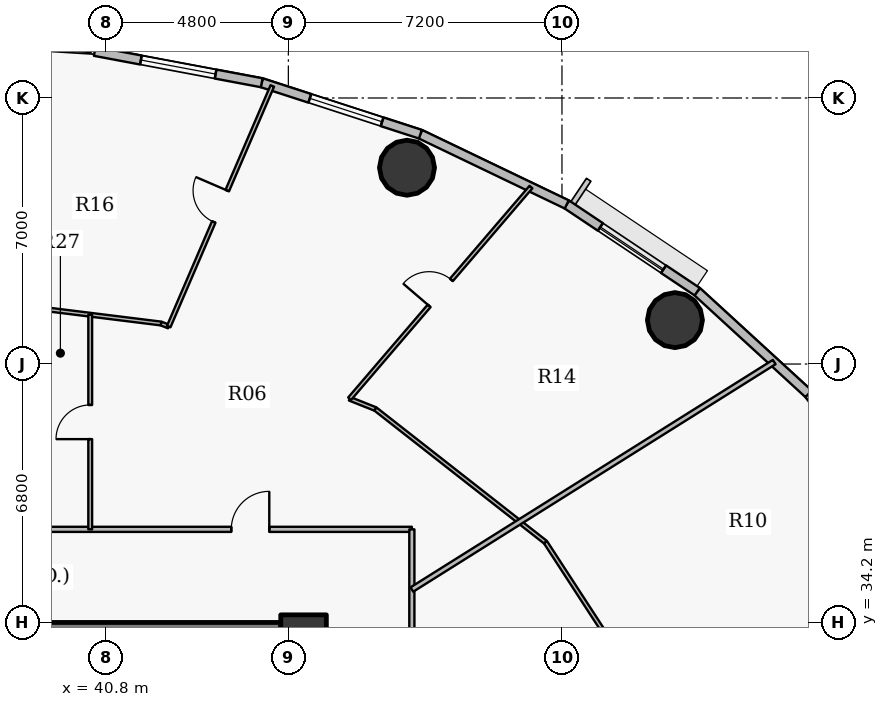
"""IFC4 building model, lengths in metres.
Left out: names, types, materials, properties, quantities, classifications, styles, units other than length and angle.
Written with IfcOpenShell. Run it as: python <this file> out.ifc"""

import sys

from ifc_helpers import new_model, si_unit, direction, frame, frame_2d, origin, origin_2d, place, context, subcontext, project, spatial, rectangle, hollow_circle, extrude, source, transform, mapped, element, fill, save


model = new_model("IFC4")
c1 = context("Model", 3, precision=1e-05, world=origin(), true_north=direction((0.0, 1.0)))
c2 = subcontext(c1, "Body", "Model", "MODEL_VIEW")
j1 = project(units=[si_unit("LENGTHUNIT", "METRE"), si_unit("PLANEANGLEUNIT", "RADIAN")], contexts=[c1])
p1 = place(None, origin())
s1 = spatial("IfcSite", under=j1, at=p1, CompositionType="ELEMENT")
p2 = place(p1, origin())
s2 = spatial("IfcBuilding", under=s1, at=p2, CompositionType="ELEMENT")
p3 = place(p2, frame((0.0, 0.0, 123.45)))
s3 = spatial("IfcBuildingStorey", under=s2, at=p3, CompositionType="ELEMENT", Elevation=123.45)
p4 = place(p3, frame((46.0, 33.8, 0.0), z_axis=(0.0, 0.0, 1.0), x_axis=(1.0, 0.0, 0.0)))
e1 = element("IfcColumn", 1, at=p4, inside=s3, PredefinedType="COLUMN", context=c2, shape_type="SweptSolid", body=[
    extrude(rectangle(XDim=1.2, YDim=1.2, at=origin_2d()), origin(), (0.0, 0.0, 1.0), 3.75),
])
p5 = place(p3, frame((26.6, 33.8, 0.0), z_axis=(0.0, 0.0, 1.0), x_axis=(1.0, 0.0, 0.0)))
e2 = element("IfcWall", 2, at=p5, inside=s3, PredefinedType="SHEAR", context=c2, shape_type="SweptSolid", body=[
    extrude(rectangle(XDim=18.8, YDim=0.8, at=frame_2d((9.4, 0.0))), origin(), (0.0, 0.0, 1.0), 2.95),
])
for number, where, z_axis, x_axis in (
    (3, (55.773, 42.156, 0.0), (0.0, 0.0, 1.0), (1.0, 0.0, 0.0)),
    (4, (48.722, 46.165, 0.0), (0.0, 0.0, 1.0), (1.0, 0.0, 0.0)),
):
    element("IfcColumn", number, at=place(p3, frame(where, z_axis=z_axis, x_axis=x_axis)), inside=s3, PredefinedType="COLUMN", context=c2, shape_type="SweptSolid", body=[
        extrude(hollow_circle(Radius=0.725, WallThickness=0.042, at=origin_2d()), origin(), (0.0, 0.0, 1.0), 3.75),
    ])
p6 = place(p3, frame((59.289, 40.217, 0.0), z_axis=(0.0, 0.0, 1.0), x_axis=(0.616272103517, -0.787533297345, 0.0)))
e5 = element("IfcWall", 5, at=p6, inside=s3, PredefinedType="SOLIDWALL", context=c2, shape_type="SweptSolid", body=[
    extrude(rectangle(XDim=3.823, YDim=0.24, at=frame_2d((1.912, 0.0))), origin(), (0.0, 0.0, 1.0), 3.5),
])
p7 = place(p6, frame((0.912, 0.0, 0.9)))
e6 = element("IfcOpeningElement", 6, at=p7, cuts=e5, PredefinedType="OPENING", context=c2, shape_type="SweptSolid", body=[
    extrude(rectangle(XDim=2.0, YDim=1.75, at=origin_2d()), frame((1.0, 0.13, 0.875), z_axis=(0.0, -1.0, 0.0), x_axis=(1.0, 0.0, 0.0)), (0.0, 0.0, 1.0), 0.26),
])
p8 = place(p3, frame((56.358, 42.903, 0.0), z_axis=(0.0, 0.0, 1.0), x_axis=(0.737113356241, -0.675769117414, 0.0)))
e7 = element("IfcWall", 7, at=p8, inside=s3, PredefinedType="SOLIDWALL", context=c2, shape_type="SweptSolid", body=[
    extrude(rectangle(XDim=3.976, YDim=0.24, at=frame_2d((1.988, 0.0))), origin(), (0.0, 0.0, 1.0), 3.5),
])
p9 = place(p3, frame((52.925, 45.199, 0.0), z_axis=(0.0, 0.0, 1.0), x_axis=(0.831221811447, -0.555940914284, 0.0)))
e8 = element("IfcWall", 8, at=p9, inside=s3, PredefinedType="SOLIDWALL", context=c2, shape_type="SweptSolid", body=[
    extrude(rectangle(XDim=4.13, YDim=0.24, at=frame_2d((2.065, 0.0))), origin(), (0.0, 0.0, 1.0), 3.5),
])
p10 = place(p9, frame((1.065, 0.0, 0.9)))
e9 = element("IfcOpeningElement", 9, at=p10, cuts=e8, PredefinedType="OPENING", context=c2, shape_type="SweptSolid", body=[
    extrude(rectangle(XDim=2.0, YDim=1.75, at=origin_2d()), frame((1.0, 0.13, 0.875), z_axis=(0.0, -1.0, 0.0), x_axis=(1.0, 0.0, 0.0)), (0.0, 0.0, 1.0), 0.26),
])
p11 = place(p3, frame((49.074, 47.047, 0.0), z_axis=(0.0, 0.0, 1.0), x_axis=(0.901589935876, -0.432591709962, 0.0)))
e10 = element("IfcWall", 10, at=p11, inside=s3, PredefinedType="SOLIDWALL", context=c2, shape_type="SweptSolid", body=[
    extrude(rectangle(XDim=4.272, YDim=0.24, at=frame_2d((2.136, 0.0))), origin(), (0.0, 0.0, 1.0), 3.5),
])
p12 = place(p3, frame((44.9, 48.401, 0.0), z_axis=(0.0, 0.0, 1.0), x_axis=(0.951211346073, -0.308540070495, 0.0)))
e11 = element("IfcWall", 11, at=p12, inside=s3, PredefinedType="SOLIDWALL", context=c2, shape_type="SweptSolid", body=[
    extrude(rectangle(XDim=4.388, YDim=0.24, at=frame_2d((2.194, 0.0))), origin(), (0.0, 0.0, 1.0), 3.5),
])
p13 = place(p12, frame((1.329, 0.0, 0.9)))
e12 = element("IfcOpeningElement", 12, at=p13, cuts=e11, PredefinedType="OPENING", context=c2, shape_type="SweptSolid", body=[
    extrude(rectangle(XDim=2.0, YDim=1.75, at=origin_2d()), frame((1.0, 0.13, 0.875), z_axis=(0.0, -1.0, 0.0), x_axis=(1.0, 0.0, 0.0)), (0.0, 0.0, 1.0), 0.26),
])
p14 = place(p3, frame((40.506, 49.227, 0.0), z_axis=(0.0, 0.0, 1.0), x_axis=(0.982789252177, -0.184730305596, 0.0)))
e13 = element("IfcWall", 13, at=p14, inside=s3, PredefinedType="SOLIDWALL", context=c2, shape_type="SweptSolid", body=[
    extrude(rectangle(XDim=4.471, YDim=0.24, at=frame_2d((2.235, 0.0))), origin(), (0.0, 0.0, 1.0), 3.5),
])
p15 = place(p14, frame((1.236, 0.0, 0.9)))
e14 = element("IfcOpeningElement", 14, at=p15, cuts=e13, PredefinedType="OPENING", context=c2, shape_type="SweptSolid", body=[
    extrude(rectangle(XDim=2.0, YDim=1.75, at=origin_2d()), frame((1.0, 0.13, 0.875), z_axis=(0.0, -1.0, 0.0), x_axis=(1.0, 0.0, 0.0)), (0.0, 0.0, 1.0), 0.26),
])
p16 = place(p3, frame((36.0, 42.841, 0.0), z_axis=(0.0, 0.0, 1.0), x_axis=(0.992395485088, -0.123090215599, 0.0)))
e15 = element("IfcWall", 15, at=p16, inside=s3, PredefinedType="PARTITIONING", context=c2, shape_type="SweptSolid", body=[
    extrude(rectangle(XDim=6.299, YDim=0.1, at=frame_2d((3.15, 0.0))), origin(), (0.0, 0.0, 1.0), 2.935),
])
p17 = place(p3, frame((38.477, 36.65, 0.0), z_axis=(0.0, 0.0, 1.0), x_axis=(1.0, 0.0, 0.0)))
e16 = element("IfcWall", 16, at=p17, inside=s3, PredefinedType="PARTITIONING", context=c2, shape_type="SweptSolid", body=[
    extrude(rectangle(XDim=10.373, YDim=0.135, at=frame_2d((5.187, 0.0))), origin(), (0.0, 0.0, 1.0), 2.935),
])
p18 = place(p17, frame((5.621, 0.0, 0.0)))
e17 = element("IfcOpeningElement", 17, at=p18, cuts=e16, PredefinedType="OPENING", context=c2, shape_type="SweptSolid", body=[
    extrude(rectangle(XDim=1.0, YDim=2.15, at=origin_2d()), frame((0.5, 0.078, 1.075), z_axis=(0.0, -1.0, 0.0), x_axis=(1.0, 0.0, 0.0)), (0.0, 0.0, 1.0), 0.155),
])
p19 = place(p3, frame((40.386, 36.65, 0.0), z_axis=(0.0, 0.0, 1.0), x_axis=(0.0, 1.0, 0.0)))
e18 = element("IfcWall", 18, at=p19, inside=s3, PredefinedType="PARTITIONING", context=c2, shape_type="SweptSolid", body=[
    extrude(rectangle(XDim=5.647, YDim=0.1, at=frame_2d((2.824, 0.0))), origin(), (0.0, 0.0, 1.0), 3.185),
])
p20 = place(p19, frame((2.374, 0.0, 0.0)))
e19 = element("IfcOpeningElement", 19, at=p20, cuts=e18, PredefinedType="OPENING", context=c2, shape_type="SweptSolid", body=[
    extrude(rectangle(XDim=0.9, YDim=2.1, at=origin_2d()), frame((0.45, 0.06, 1.05), z_axis=(0.0, -1.0, 0.0), x_axis=(1.0, 0.0, 0.0)), (0.0, 0.0, 1.0), 0.12),
])
p21 = place(p3, frame((42.251, 42.066, 0.0), z_axis=(0.0, 0.0, 1.0), x_axis=(0.928632622675, -0.371000609303, 0.0)))
e20 = element("IfcWall", 20, at=p21, inside=s3, PredefinedType="PARTITIONING", context=c2, shape_type="SweptSolid", body=[
    extrude(rectangle(XDim=0.216, YDim=0.1, at=frame_2d((0.108, 0.0))), origin(), (0.0, 0.0, 1.0), 3.5),
])
p22 = place(p3, frame((42.452, 41.986, 0.0), z_axis=(0.0, 0.0, 1.0), x_axis=(0.395466235438, 0.918480515105, 0.0)))
e21 = element("IfcWall", 21, at=p22, inside=s3, PredefinedType="PARTITIONING", context=c2, shape_type="SweptSolid", body=[
    extrude(rectangle(XDim=6.893, YDim=0.1, at=frame_2d((3.446, 0.0))), origin(), (0.0, 0.0, 1.0), 2.935),
])
p23 = place(p22, frame((2.996, 0.0, 0.0)))
e22 = element("IfcOpeningElement", 22, at=p23, cuts=e21, PredefinedType="OPENING", context=c2, shape_type="SweptSolid", body=[
    extrude(rectangle(XDim=0.9, YDim=2.1, at=origin_2d()), frame((0.45, 0.06, 1.05), z_axis=(0.0, -1.0, 0.0), x_axis=(1.0, 0.0, 0.0)), (0.0, 0.0, 1.0), 0.12),
])
p24 = place(p3, frame((47.212, 40.087, 0.0), z_axis=(0.0, 0.0, 1.0), x_axis=(0.928752817467, -0.370699614307, 0.0)))
e23 = element("IfcWall", 23, at=p24, inside=s3, PredefinedType="PARTITIONING", context=c2, shape_type="SweptSolid", body=[
    extrude(rectangle(XDim=0.731, YDim=0.1, at=frame_2d((0.365, 0.0))), origin(), (0.0, 0.0, 1.0), 3.085),
])
p25 = place(p3, frame((47.212, 40.087, 0.0), z_axis=(0.0, 0.0, 1.0), x_axis=(0.650621399292, 0.759402261508, 0.0)))
e24 = element("IfcWall", 24, at=p25, inside=s3, PredefinedType="PARTITIONING", context=c2, shape_type="SweptSolid", body=[
    extrude(rectangle(XDim=7.334, YDim=0.1, at=frame_2d((3.667, 0.0))), origin(), (0.0, 0.0, 1.0), 2.935),
])
p26 = place(p25, frame((3.217, 0.0, 0.0)))
e25 = element("IfcOpeningElement", 25, at=p26, cuts=e24, PredefinedType="OPENING", context=c2, shape_type="SweptSolid", body=[
    extrude(rectangle(XDim=0.9, YDim=2.1, at=origin_2d()), frame((0.45, 0.06, 1.05), z_axis=(0.0, -1.0, 0.0), x_axis=(1.0, 0.0, 0.0)), (0.0, 0.0, 1.0), 0.12),
])
p27 = place(p3, frame((47.891, 39.816, 0.0), z_axis=(0.0, 0.0, 1.0), x_axis=(0.787338202739, -0.616521333376, 0.0)))
e26 = element("IfcWall", 26, at=p27, inside=s3, PredefinedType="PARTITIONING", context=c2, shape_type="SweptSolid", body=[
    extrude(rectangle(XDim=5.684, YDim=0.1, at=frame_2d((2.842, 0.0))), origin(), (0.0, 0.0, 1.0), 2.935),
])
p28 = place(p3, frame((48.85, 17.35, 0.0), z_axis=(0.0, 0.0, 1.0), x_axis=(0.0, 1.0, 0.0)))
e27 = element("IfcWall", 27, at=p28, inside=s3, PredefinedType="PARTITIONING", context=c2, shape_type="SweptSolid", body=[
    extrude(rectangle(XDim=19.3, YDim=0.135, at=frame_2d((9.65, 0.0))), origin(), (0.0, 0.0, 1.0), 2.935),
])
p29 = place(p28, frame((2.036, 0.0, 0.0)))
e28 = element("IfcOpeningElement", 28, at=p29, cuts=e27, PredefinedType="OPENING", context=c2, shape_type="SweptSolid", body=[
    extrude(rectangle(XDim=1.0, YDim=2.15, at=origin_2d()), frame((0.5, 0.078, 1.075), z_axis=(0.0, -1.0, 0.0), x_axis=(1.0, 0.0, 0.0)), (0.0, 0.0, 1.0), 0.155),
])
p30 = place(p28, frame((10.875, 0.0, 0.0)))
e29 = element("IfcOpeningElement", 29, at=p30, cuts=e27, PredefinedType="OPENING", context=c2, shape_type="SweptSolid", body=[
    extrude(rectangle(XDim=1.0, YDim=2.15, at=origin_2d()), frame((0.5, 0.078, 1.075), z_axis=(0.0, -1.0, 0.0), x_axis=(1.0, 0.0, 0.0)), (0.0, 0.0, 1.0), 0.155),
])
p31 = place(p3, frame((48.85, 35.066, 0.0), z_axis=(0.0, 0.0, 1.0), x_axis=(0.846963568038, 0.531650932866, 0.0)))
e30 = element("IfcWall", 30, at=p31, inside=s3, PredefinedType="PARTITIONING", context=c2, shape_type="SweptSolid", body=[
    extrude(rectangle(XDim=11.258, YDim=0.135, at=frame_2d((5.629, 0.0))), origin(), (0.0, 0.0, 1.0), 2.935),
])
p32 = place(p3, frame((52.366, 36.311, 0.0), z_axis=(0.0, 0.0, 1.0), x_axis=(0.545394651961, -0.838179380331, 0.0)))
e31 = element("IfcWall", 31, at=p32, inside=s3, PredefinedType="PARTITIONING", context=c2, shape_type="SweptSolid", body=[
    extrude(rectangle(XDim=5.068, YDim=0.1, at=frame_2d((2.534, 0.0))), origin(), (0.0, 0.0, 1.0), 3.5),
])
p33 = place(p3, frame((55.131, 32.063, 0.0), z_axis=(0.0, 0.0, 1.0), x_axis=(0.96671793708, 0.255844542893, 0.0)))
e32 = element("IfcWall", 32, at=p33, inside=s3, PredefinedType="PARTITIONING", context=c2, shape_type="SweptSolid", body=[
    extrude(rectangle(XDim=8.385, YDim=0.1, at=frame_2d((4.192, 0.0))), origin(), (0.0, 0.0, 1.0), 2.935),
])
p34 = place(p33, frame((2.65, 0.0, 0.0)))
e33 = element("IfcOpeningElement", 33, at=p34, cuts=e32, PredefinedType="OPENING", context=c2, shape_type="SweptSolid", body=[
    extrude(rectangle(XDim=0.9, YDim=2.1, at=origin_2d()), frame((0.45, 0.06, 1.05), z_axis=(0.0, -1.0, 0.0), x_axis=(1.0, 0.0, 0.0)), (0.0, 0.0, 1.0), 0.12),
])
p35 = place(p3, frame((46.4, 34.2, 0.0), z_axis=(0.0, 0.0, 1.0), x_axis=(-1.0, 0.0, 0.0)))
e34 = element("IfcWall", 34, at=p35, inside=s3, PredefinedType="PARTITIONING", context=c2, shape_type="SweptSolid", body=[
    extrude(rectangle(XDim=0.99, YDim=0.135, at=frame_2d((0.495, 0.0))), origin(), (0.0, 0.0, 1.0), 2.935),
])
m1 = source(origin(), c2, "Body", "SweptSolid", [
    extrude(rectangle(XDim=2.0, YDim=1.75, at=origin_2d()), frame((1.0, 0.03, 0.875), z_axis=(0.0, -1.0, 0.0), x_axis=(1.0, 0.0, 0.0)), (0.0, 0.0, 1.0), 0.06),
])
p36 = place(p10, origin())
e35 = element("IfcWindow", 35, at=p36, inside=s3, PartitioningType="DOUBLE_PANEL_VERTICAL", PredefinedType="WINDOW", context=c2, shape_type="MappedRepresentation", body=[
    mapped(m1, transform((0.0, 0.0, 0.0), x_axis=(1.0, 0.0, 0.0), y_axis=(0.0, 1.0, 0.0), z_axis=(0.0, 0.0, 1.0), scale=1.0)),
])
fill(e9, e35)
p37 = place(p13, origin())
e36 = element("IfcWindow", 36, at=p37, inside=s3, PartitioningType="DOUBLE_PANEL_VERTICAL", PredefinedType="WINDOW", context=c2, shape_type="MappedRepresentation", body=[
    mapped(m1, transform((0.0, 0.0, 0.0), x_axis=(1.0, 0.0, 0.0), y_axis=(0.0, 1.0, 0.0), z_axis=(0.0, 0.0, 1.0), scale=1.0)),
])
fill(e12, e36)
p38 = place(p15, origin())
e37 = element("IfcWindow", 37, at=p38, inside=s3, PartitioningType="DOUBLE_PANEL_VERTICAL", PredefinedType="WINDOW", context=c2, shape_type="MappedRepresentation", body=[
    mapped(m1, transform((0.0, 0.0, 0.0), x_axis=(1.0, 0.0, 0.0), y_axis=(0.0, 1.0, 0.0), z_axis=(0.0, 0.0, 1.0), scale=1.0)),
])
fill(e14, e37)
m2 = source(origin(), c2, "Body", "SweptSolid", [
    extrude(rectangle(XDim=1.0, YDim=2.15, at=origin_2d()), frame((0.5, 0.025, 1.075), z_axis=(0.0, -1.0, 0.0), x_axis=(1.0, 0.0, 0.0)), (0.0, 0.0, 1.0), 0.05),
])
p39 = place(p18, origin())
e38 = element("IfcDoor", 38, at=p39, inside=s3, OperationType="SINGLE_SWING_RIGHT", PredefinedType="DOOR", context=c2, shape_type="MappedRepresentation", body=[
    mapped(m2, transform((0.0, 0.0, 0.0), x_axis=(1.0, 0.0, 0.0), y_axis=(0.0, 1.0, 0.0), z_axis=(0.0, 0.0, 1.0), scale=1.0)),
])
fill(e17, e38)
m3 = source(origin(), c2, "Body", "SweptSolid", [
    extrude(rectangle(XDim=0.9, YDim=2.1, at=origin_2d()), frame((0.45, 0.025, 1.05), z_axis=(0.0, -1.0, 0.0), x_axis=(1.0, 0.0, 0.0)), (0.0, 0.0, 1.0), 0.05),
])
p40 = place(p26, origin())
e39 = element("IfcDoor", 39, at=p40, inside=s3, OperationType="SINGLE_SWING_LEFT", PredefinedType="DOOR", context=c2, shape_type="MappedRepresentation", body=[
    mapped(m3, transform((0.0, 0.0, 0.0), x_axis=(1.0, 0.0, 0.0), y_axis=(0.0, 1.0, 0.0), z_axis=(0.0, 0.0, 1.0), scale=1.0)),
])
fill(e25, e39)
p41 = place(p23, origin())
e40 = element("IfcDoor", 40, at=p41, inside=s3, OperationType="SINGLE_SWING_RIGHT", PredefinedType="DOOR", context=c2, shape_type="MappedRepresentation", body=[
    mapped(m3, transform((0.0, 0.0, 0.0), x_axis=(1.0, 0.0, 0.0), y_axis=(0.0, 1.0, 0.0), z_axis=(0.0, 0.0, 1.0), scale=1.0)),
])
fill(e22, e40)
p42 = place(p20, origin())
e41 = element("IfcDoor", 41, at=p42, inside=s3, OperationType="SINGLE_SWING_LEFT", PredefinedType="DOOR", context=c2, shape_type="MappedRepresentation", body=[
    mapped(m3, transform((0.0, 0.0, 0.0), x_axis=(1.0, 0.0, 0.0), y_axis=(0.0, 1.0, 0.0), z_axis=(0.0, 0.0, 1.0), scale=1.0)),
])
fill(e19, e41)
save(model, sys.argv[1])
